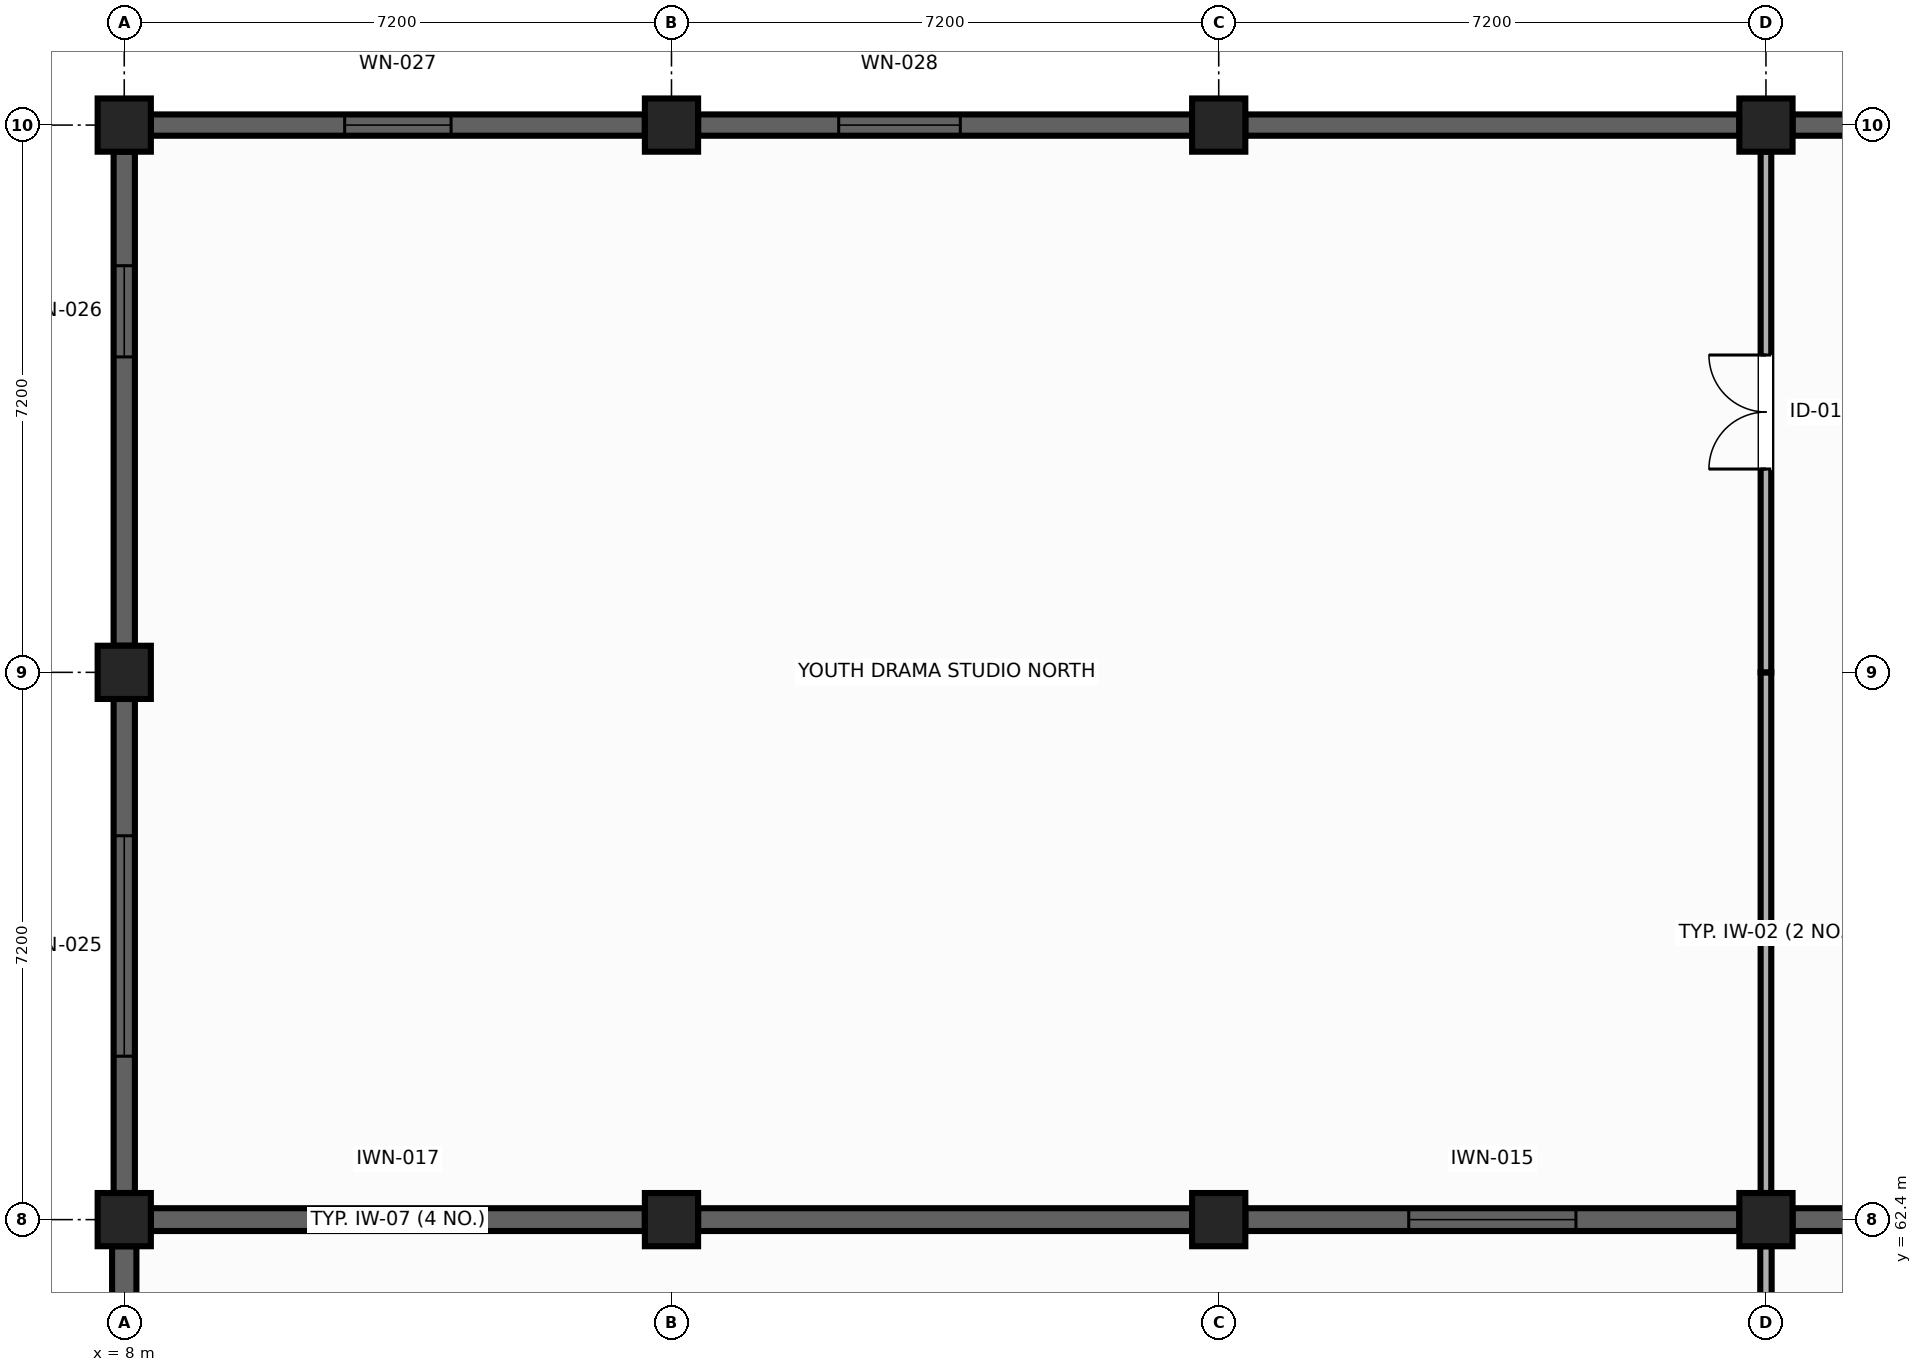
"""IFC4 building model, lengths in metres.
Left out: names, types, materials, properties, quantities, classifications, styles, units other than length and angle.
Written with IfcOpenShell. Run it as: python <this file> out.ifc"""

import sys

from ifc_helpers import new_model, si_unit, direction, frame, frame_2d, origin, origin_2d, place, context, subcontext, project, spatial, rectangle, extrude, element, fill, save


model = new_model("IFC4")
c1 = context("Model", 3, precision=1e-05, world=origin(), true_north=direction((0.0, 1.0)))
c2 = subcontext(c1, "Body", "Model", "MODEL_VIEW")
j1 = project(units=[si_unit("LENGTHUNIT", "METRE"), si_unit("PLANEANGLEUNIT", "RADIAN")], contexts=[c1])
p1 = place(None, origin())
s1 = spatial("IfcSite", under=j1, at=p1, CompositionType="ELEMENT")
p2 = place(p1, origin())
s2 = spatial("IfcBuilding", under=s1, at=p2, CompositionType="ELEMENT")
p3 = place(p2, frame((0.0, 0.0, 5.4)))
s3 = spatial("IfcBuildingStorey", under=s2, at=p3, CompositionType="ELEMENT", Elevation=5.4)
for number, where, z_axis, x_axis in (
    (1, (8.0, 62.4, 0.0), (0.0, 0.0, 1.0), (1.0, 0.0, 0.0)),
    (2, (15.2, 62.4, 0.0), (0.0, 0.0, 1.0), (0.0, 1.0, 0.0)),
    (3, (22.4, 62.4, 0.0), (0.0, 0.0, 1.0), (1.0, 0.0, 0.0)),
    (4, (29.6, 62.4, 0.0), (0.0, 0.0, 1.0), (1.0, 0.0, 0.0)),
):
    element("IfcColumn", number, at=place(p3, frame(where, z_axis=z_axis, x_axis=x_axis)), inside=s3, PredefinedType="COLUMN", context=c2, shape_type="SweptSolid", body=[
        extrude(rectangle(XDim=0.7, YDim=0.7, at=origin_2d()), origin(), (0.0, 0.0, 1.0), 4.28),
    ])
p4 = place(p3, frame((8.0, 69.6, 0.0), z_axis=(0.0, 0.0, 1.0), x_axis=(0.0, 1.0, 0.0)))
e5 = element("IfcColumn", 5, at=p4, inside=s3, PredefinedType="COLUMN", context=c2, shape_type="SweptSolid", body=[
    extrude(rectangle(XDim=0.7, YDim=0.7, at=origin_2d()), origin(), (0.0, 0.0, 1.0), 6.234),
])
for number, where, z_axis, x_axis in (
    (6, (8.0, 76.8, 0.0), (0.0, 0.0, 1.0), (1.0, 0.0, 0.0)),
    (7, (15.2, 76.8, 0.0), (0.0, 0.0, 1.0), (1.0, 0.0, 0.0)),
    (8, (22.4, 76.8, 0.0), (0.0, 0.0, 1.0), (0.0, 1.0, 0.0)),
    (9, (29.6, 76.8, 0.0), (0.0, 0.0, 1.0), (1.0, 0.0, 0.0)),
):
    element("IfcColumn", number, at=place(p3, frame(where, z_axis=z_axis, x_axis=x_axis)), inside=s3, PredefinedType="COLUMN", context=c2, shape_type="SweptSolid", body=[
        extrude(rectangle(XDim=0.7, YDim=0.7, at=origin_2d()), origin(), (0.0, 0.0, 1.0), 4.334),
    ])
p5 = place(p3, frame((8.0, 55.55, 0.0), z_axis=(0.0, 0.0, 1.0), x_axis=(0.0, 1.0, 0.0)))
e10 = element("IfcWall", 10, at=p5, inside=s3, PredefinedType="SOLIDWALL", context=c2, shape_type="SweptSolid", body=[
    extrude(rectangle(XDim=6.5, YDim=0.32, at=frame_2d((3.25, 0.0))), origin(), (0.0, 0.0, 1.0), 4.28),
])
p6 = place(p3, frame((8.0, 62.75, 0.0), z_axis=(0.0, 0.0, 1.0), x_axis=(0.0, 1.0, 0.0)))
e11 = element("IfcWall", 11, at=p6, inside=s3, PredefinedType="SOLIDWALL", context=c2, shape_type="SweptSolid", body=[
    extrude(rectangle(XDim=6.5, YDim=0.28, at=frame_2d((3.25, 0.0))), origin(), (0.0, 0.0, 1.0), 4.5),
])
p7 = place(p6, frame((1.8, 0.0, 0.9)))
e12 = element("IfcOpeningElement", 12, at=p7, cuts=e11, PredefinedType="OPENING", context=c2, shape_type="SweptSolid", body=[
    extrude(rectangle(XDim=2.9, YDim=1.6, at=frame_2d((1.45, 0.8))), frame((0.0, 0.15, 0.0), z_axis=(0.0, -1.0, 0.0), x_axis=(1.0, 0.0, 0.0)), (0.0, 0.0, 1.0), 0.3),
])
p8 = place(p3, frame((8.0, 69.95, 0.0), z_axis=(0.0, 0.0, 1.0), x_axis=(0.0, 1.0, 0.0)))
e13 = element("IfcWall", 13, at=p8, inside=s3, PredefinedType="SOLIDWALL", context=c2, shape_type="SweptSolid", body=[
    extrude(rectangle(XDim=6.5, YDim=0.28, at=frame_2d((3.25, 0.0))), origin(), (0.0, 0.0, 1.0), 4.5),
])
p9 = place(p8, frame((3.8, 0.0, 0.9)))
e14 = element("IfcOpeningElement", 14, at=p9, cuts=e13, PredefinedType="OPENING", context=c2, shape_type="SweptSolid", body=[
    extrude(rectangle(XDim=1.2, YDim=1.8, at=frame_2d((0.6, 0.9))), frame((0.0, 0.15, 0.0), z_axis=(0.0, -1.0, 0.0), x_axis=(1.0, 0.0, 0.0)), (0.0, 0.0, 1.0), 0.3),
])
p10 = place(p3, frame((8.35, 76.8, 0.0), z_axis=(0.0, 0.0, 1.0), x_axis=(1.0, 0.0, 0.0)))
e15 = element("IfcWall", 15, at=p10, inside=s3, PredefinedType="SOLIDWALL", context=c2, shape_type="SweptSolid", body=[
    extrude(rectangle(XDim=6.5, YDim=0.28, at=frame_2d((3.25, 0.0))), origin(), (0.0, 0.0, 1.0), 4.334),
])
p11 = place(p10, frame((2.55, 0.0, 0.9)))
e16 = element("IfcOpeningElement", 16, at=p11, cuts=e15, PredefinedType="OPENING", context=c2, shape_type="SweptSolid", body=[
    extrude(rectangle(XDim=1.4, YDim=1.8, at=frame_2d((0.7, 0.9))), frame((0.0, 0.15, 0.0), z_axis=(0.0, -1.0, 0.0), x_axis=(1.0, 0.0, 0.0)), (0.0, 0.0, 1.0), 0.3),
])
p12 = place(p3, frame((15.55, 76.8, 0.0), z_axis=(0.0, 0.0, 1.0), x_axis=(1.0, 0.0, 0.0)))
e17 = element("IfcWall", 17, at=p12, inside=s3, PredefinedType="SOLIDWALL", context=c2, shape_type="SweptSolid", body=[
    extrude(rectangle(XDim=6.5, YDim=0.28, at=frame_2d((3.25, 0.0))), origin(), (0.0, 0.0, 1.0), 4.334),
])
p13 = place(p12, frame((1.85, 0.0, 0.9)))
e18 = element("IfcOpeningElement", 18, at=p13, cuts=e17, PredefinedType="OPENING", context=c2, shape_type="SweptSolid", body=[
    extrude(rectangle(XDim=1.6, YDim=1.8, at=frame_2d((0.8, 0.9))), frame((0.0, 0.15, 0.0), z_axis=(0.0, -1.0, 0.0), x_axis=(1.0, 0.0, 0.0)), (0.0, 0.0, 1.0), 0.3),
])
p14 = place(p3, frame((22.75, 76.8, 0.0), z_axis=(0.0, 0.0, 1.0), x_axis=(1.0, 0.0, 0.0)))
e19 = element("IfcWall", 19, at=p14, inside=s3, PredefinedType="SOLIDWALL", context=c2, shape_type="SweptSolid", body=[
    extrude(rectangle(XDim=6.5, YDim=0.28, at=frame_2d((3.25, 0.0))), origin(), (0.0, 0.0, 1.0), 4.334),
])
p15 = place(p3, frame((29.95, 76.8, 0.0), z_axis=(0.0, 0.0, 1.0), x_axis=(1.0, 0.0, 0.0)))
e20 = element("IfcWall", 20, at=p15, inside=s3, PredefinedType="SOLIDWALL", context=c2, shape_type="SweptSolid", body=[
    extrude(rectangle(XDim=6.5, YDim=0.28, at=frame_2d((3.25, 0.0))), origin(), (0.0, 0.0, 1.0), 4.334),
])
p16 = place(p15, frame((2.35, 0.0, 0.9)))
e21 = element("IfcOpeningElement", 21, at=p16, cuts=e20, PredefinedType="OPENING", context=c2, shape_type="SweptSolid", body=[
    extrude(rectangle(XDim=1.8, YDim=1.8, at=frame_2d((0.9, 0.9))), frame((0.0, 0.15, 0.0), z_axis=(0.0, -1.0, 0.0), x_axis=(1.0, 0.0, 0.0)), (0.0, 0.0, 1.0), 0.3),
])
p17 = place(p3, frame((8.35, 62.4, 0.0), z_axis=(0.0, 0.0, 1.0), x_axis=(1.0, 0.0, 0.0)))
e22 = element("IfcWall", 22, at=p17, inside=s3, PredefinedType="SHEAR", context=c2, shape_type="SweptSolid", body=[
    extrude(rectangle(XDim=6.5, YDim=0.3, at=frame_2d((3.25, 0.0))), origin(), (0.0, 0.0, 1.0), 4.28),
])
p18 = place(p17, frame((2.45, 0.0, 1.1)))
e23 = element("IfcOpeningElement", 23, at=p18, cuts=e22, PredefinedType="OPENING", context=c2, shape_type="SweptSolid", body=[
    extrude(rectangle(XDim=1.6, YDim=1.1, at=frame_2d((0.8, 0.55))), frame((0.0, 0.16, 0.0), z_axis=(0.0, -1.0, 0.0), x_axis=(1.0, 0.0, 0.0)), (0.0, 0.0, 1.0), 0.32),
])
p19 = place(p3, frame((15.55, 62.4, 0.0), z_axis=(0.0, 0.0, 1.0), x_axis=(1.0, 0.0, 0.0)))
e24 = element("IfcWall", 24, at=p19, inside=s3, PredefinedType="SHEAR", context=c2, shape_type="SweptSolid", body=[
    extrude(rectangle(XDim=6.5, YDim=0.3, at=frame_2d((3.25, 0.0))), origin(), (0.0, 0.0, 1.0), 4.28),
])
p20 = place(p3, frame((22.75, 62.4, 0.0), z_axis=(0.0, 0.0, 1.0), x_axis=(1.0, 0.0, 0.0)))
e25 = element("IfcWall", 25, at=p20, inside=s3, PredefinedType="SHEAR", context=c2, shape_type="SweptSolid", body=[
    extrude(rectangle(XDim=6.5, YDim=0.3, at=frame_2d((3.25, 0.0))), origin(), (0.0, 0.0, 1.0), 4.28),
])
p21 = place(p20, frame((2.15, 0.0, 1.1)))
e26 = element("IfcOpeningElement", 26, at=p21, cuts=e25, PredefinedType="OPENING", context=c2, shape_type="SweptSolid", body=[
    extrude(rectangle(XDim=2.2, YDim=1.3, at=frame_2d((1.1, 0.65))), frame((0.0, 0.16, 0.0), z_axis=(0.0, -1.0, 0.0), x_axis=(1.0, 0.0, 0.0)), (0.0, 0.0, 1.0), 0.32),
])
p22 = place(p3, frame((29.95, 62.4, 0.0), z_axis=(0.0, 0.0, 1.0), x_axis=(1.0, 0.0, 0.0)))
e27 = element("IfcWall", 27, at=p22, inside=s3, PredefinedType="SHEAR", context=c2, shape_type="SweptSolid", body=[
    extrude(rectangle(XDim=6.5, YDim=0.3, at=frame_2d((3.25, 0.0))), origin(), (0.0, 0.0, 1.0), 4.28),
])
p23 = place(p22, frame((2.35, 0.0, 0.0)))
e28 = element("IfcOpeningElement", 28, at=p23, cuts=e27, PredefinedType="OPENING", context=c2, shape_type="SweptSolid", body=[
    extrude(rectangle(XDim=1.8, YDim=2.3, at=frame_2d((0.9, 1.15))), frame((0.0, 0.16, 0.0), z_axis=(0.0, -1.0, 0.0), x_axis=(1.0, 0.0, 0.0)), (0.0, 0.0, 1.0), 0.32),
])
p24 = place(p3, frame((29.6, 55.55, 0.0), z_axis=(0.0, 0.0, 1.0), x_axis=(0.0, 1.0, 0.0)))
e29 = element("IfcWall", 29, at=p24, inside=s3, PredefinedType="PARTITIONING", context=c2, shape_type="SweptSolid", body=[
    extrude(rectangle(XDim=6.5, YDim=0.15, at=frame_2d((3.25, 0.0))), origin(), (0.0, 0.0, 1.0), 3.575),
])
p25 = place(p3, frame((29.6, 62.75, 0.0), z_axis=(0.0, 0.0, 1.0), x_axis=(0.0, 1.0, 0.0)))
e30 = element("IfcWall", 30, at=p25, inside=s3, PredefinedType="PARTITIONING", context=c2, shape_type="SweptSolid", body=[
    extrude(rectangle(XDim=6.85, YDim=0.14, at=frame_2d((3.425, 0.0))), origin(), (0.0, 0.0, 1.0), 5.33),
])
p26 = place(p3, frame((29.6, 69.6, 0.0), z_axis=(0.0, 0.0, 1.0), x_axis=(0.0, 1.0, 0.0)))
e31 = element("IfcWall", 31, at=p26, inside=s3, PredefinedType="PARTITIONING", context=c2, shape_type="SweptSolid", body=[
    extrude(rectangle(XDim=6.85, YDim=0.14, at=frame_2d((3.425, 0.0))), origin(), (0.0, 0.0, 1.0), 5.33),
])
p27 = place(p26, frame((2.675, 0.0, 0.0)))
e32 = element("IfcOpeningElement", 32, at=p27, cuts=e31, PredefinedType="OPENING", context=c2, shape_type="SweptSolid", body=[
    extrude(rectangle(XDim=1.5, YDim=2.2, at=frame_2d((0.75, 1.1))), frame((0.0, 0.08, 0.0), z_axis=(0.0, -1.0, 0.0), x_axis=(1.0, 0.0, 0.0)), (0.0, 0.0, 1.0), 0.16),
])
p28 = place(p7, origin())
e33 = element("IfcWindow", 33, at=p28, inside=s3, PartitioningType="SINGLE_PANEL", PredefinedType="WINDOW", context=c2, shape_type="SweptSolid", body=[
    extrude(rectangle(XDim=2.9, YDim=1.6, at=frame_2d((1.45, 0.8))), frame((0.0, 0.03, 0.0), z_axis=(0.0, -1.0, 0.0), x_axis=(1.0, 0.0, 0.0)), (0.0, 0.0, 1.0), 0.06),
])
fill(e12, e33)
p29 = place(p9, origin())
e34 = element("IfcWindow", 34, at=p29, inside=s3, PartitioningType="SINGLE_PANEL", PredefinedType="WINDOW", context=c2, shape_type="SweptSolid", body=[
    extrude(rectangle(XDim=1.2, YDim=1.8, at=frame_2d((0.6, 0.9))), frame((0.0, 0.03, 0.0), z_axis=(0.0, -1.0, 0.0), x_axis=(1.0, 0.0, 0.0)), (0.0, 0.0, 1.0), 0.06),
])
fill(e14, e34)
p30 = place(p11, origin())
e35 = element("IfcWindow", 35, at=p30, inside=s3, PartitioningType="SINGLE_PANEL", PredefinedType="WINDOW", context=c2, shape_type="SweptSolid", body=[
    extrude(rectangle(XDim=1.4, YDim=1.8, at=frame_2d((0.7, 0.9))), frame((0.0, 0.03, 0.0), z_axis=(0.0, -1.0, 0.0), x_axis=(1.0, 0.0, 0.0)), (0.0, 0.0, 1.0), 0.06),
])
fill(e16, e35)
p31 = place(p13, origin())
e36 = element("IfcWindow", 36, at=p31, inside=s3, PartitioningType="SINGLE_PANEL", PredefinedType="WINDOW", context=c2, shape_type="SweptSolid", body=[
    extrude(rectangle(XDim=1.6, YDim=1.8, at=frame_2d((0.8, 0.9))), frame((0.0, 0.03, 0.0), z_axis=(0.0, -1.0, 0.0), x_axis=(1.0, 0.0, 0.0)), (0.0, 0.0, 1.0), 0.06),
])
fill(e18, e36)
p32 = place(p21, origin())
e37 = element("IfcWindow", 37, at=p32, inside=s3, PartitioningType="SINGLE_PANEL", PredefinedType="WINDOW", context=c2, shape_type="SweptSolid", body=[
    extrude(rectangle(XDim=2.2, YDim=1.3, at=frame_2d((1.1, 0.65))), frame((0.0, 0.03, 0.0), z_axis=(0.0, -1.0, 0.0), x_axis=(1.0, 0.0, 0.0)), (0.0, 0.0, 1.0), 0.06),
])
fill(e26, e37)
p33 = place(p27, origin())
e38 = element("IfcDoor", 38, at=p33, inside=s3, OperationType="DOUBLE_DOOR_SINGLE_SWING", PredefinedType="DOOR", context=c2, shape_type="SweptSolid", body=[
    extrude(rectangle(XDim=1.5, YDim=2.2, at=frame_2d((0.75, 1.1))), frame((0.0, 0.025, 0.0), z_axis=(0.0, -1.0, 0.0), x_axis=(1.0, 0.0, 0.0)), (0.0, 0.0, 1.0), 0.05),
])
fill(e32, e38)
p34 = place(p18, origin())
e39 = element("IfcWindow", 39, at=p34, inside=s3, PartitioningType="SINGLE_PANEL", PredefinedType="WINDOW", context=c2, shape_type="SweptSolid", body=[
    extrude(rectangle(XDim=1.6, YDim=1.1, at=frame_2d((0.8, 0.55))), frame((0.0, 0.03, 0.0), z_axis=(0.0, -1.0, 0.0), x_axis=(1.0, 0.0, 0.0)), (0.0, 0.0, 1.0), 0.06),
])
fill(e23, e39)
save(model, sys.argv[1])
